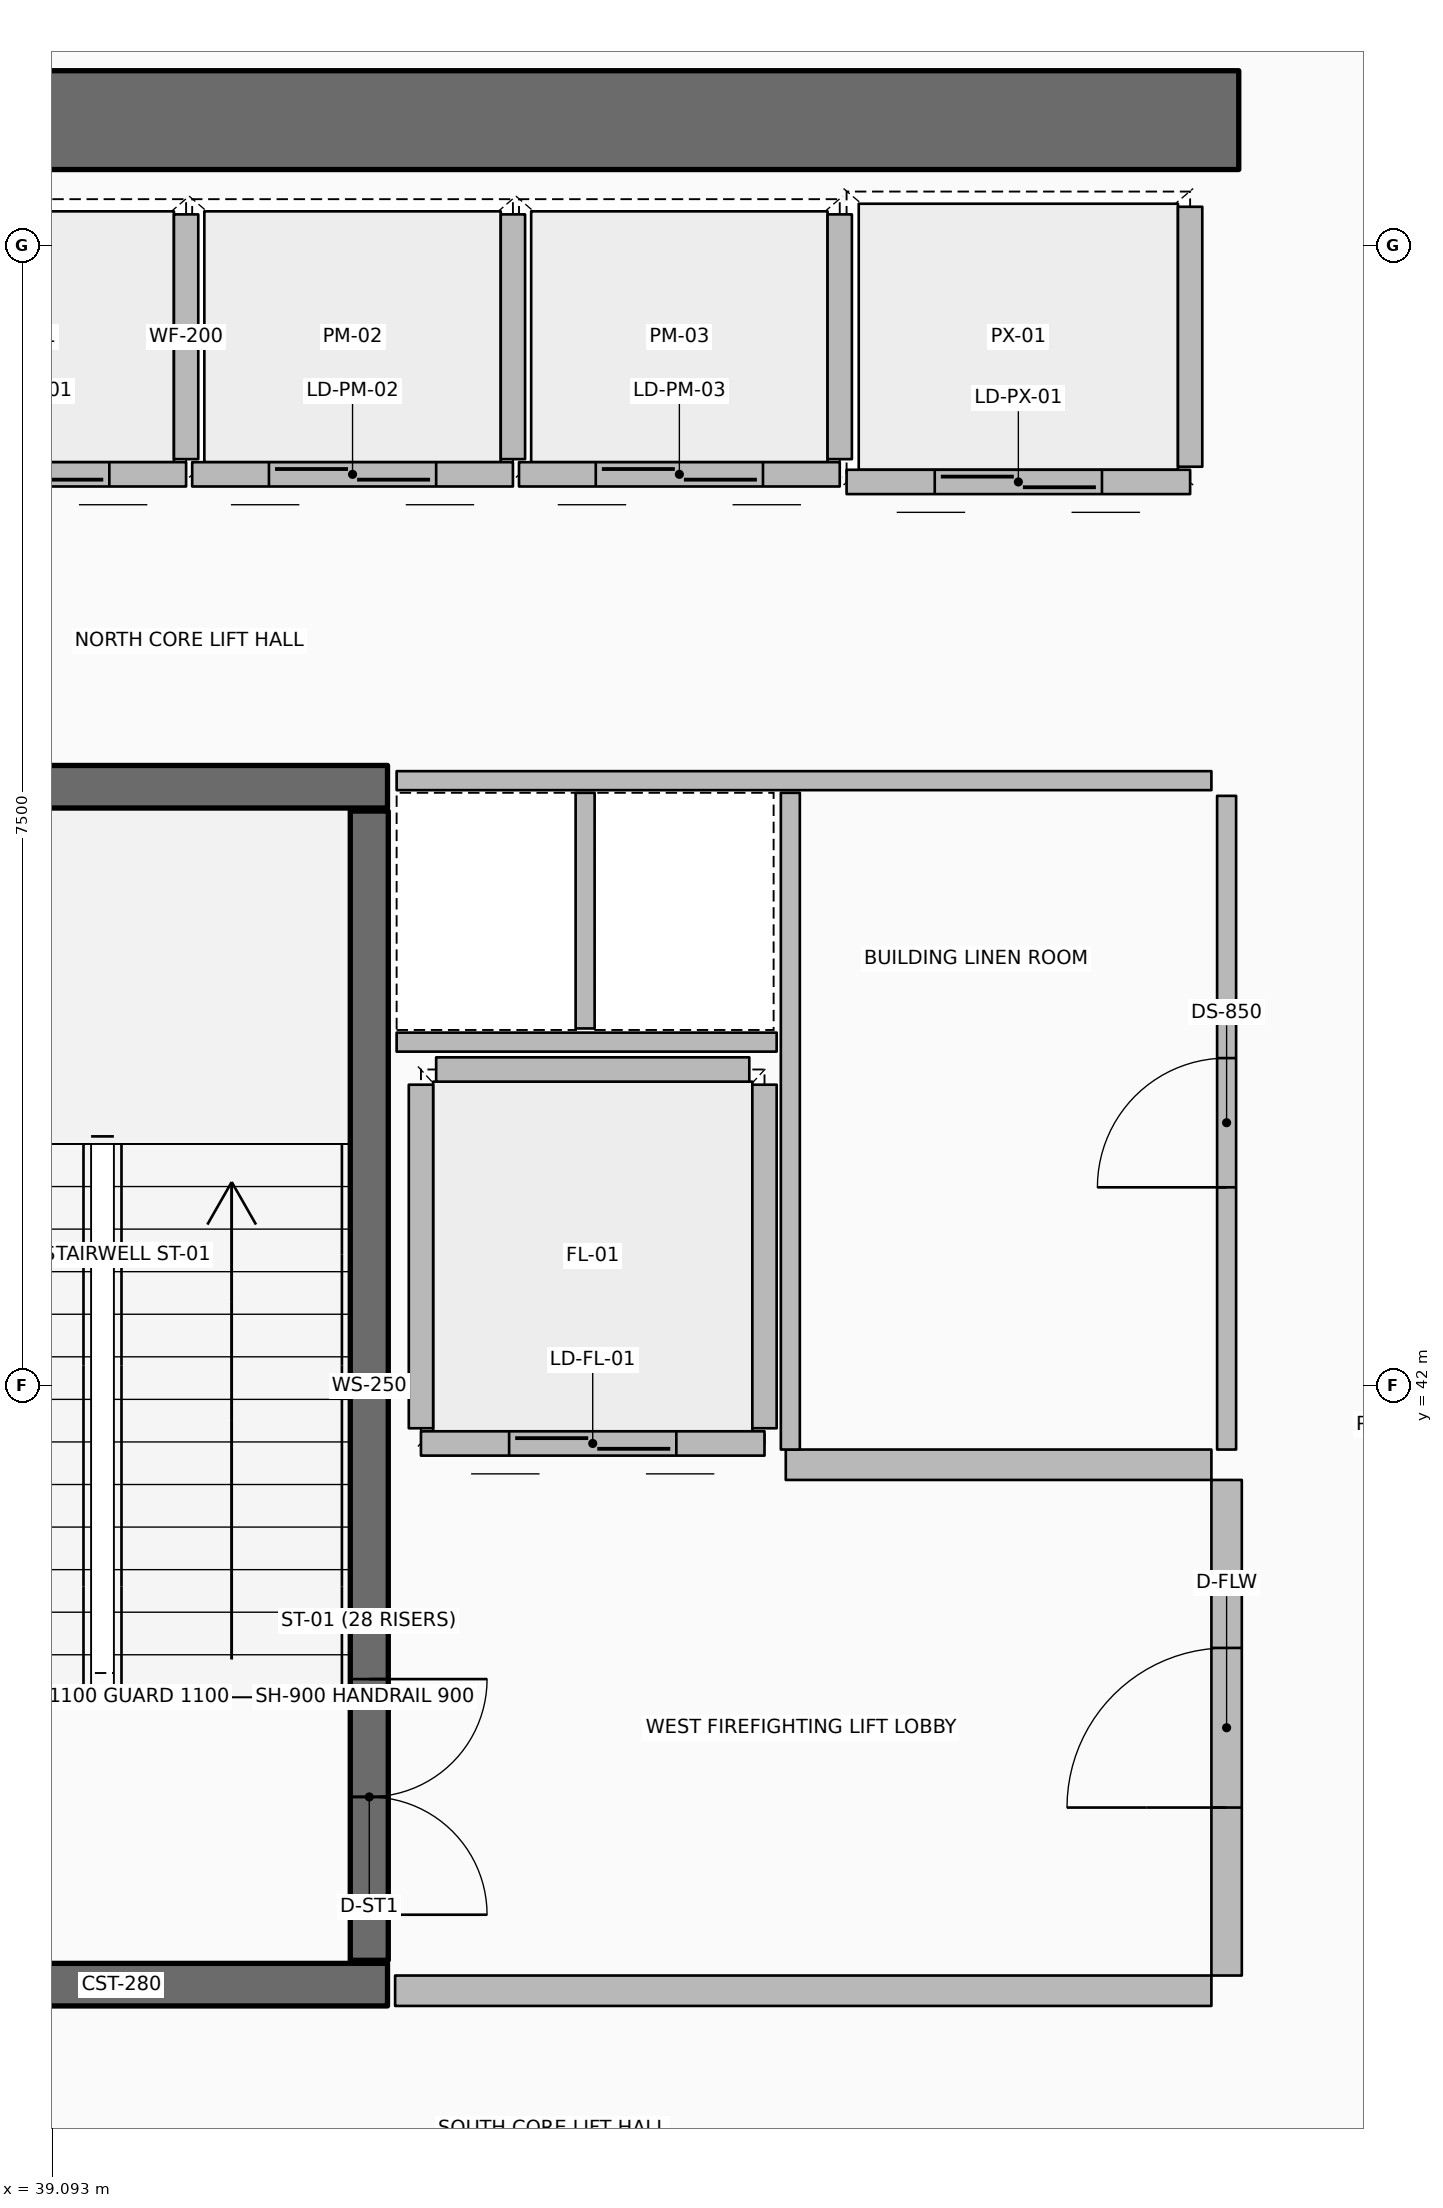
"""IFC4 building model, lengths in metres.
Left out: names, types, materials, properties, quantities, classifications, styles, units other than length and angle.
Written with IfcOpenShell. Run it as: python <this file> out.ifc"""

import sys

from ifc_helpers import new_model, si_unit, direction, frame, frame_2d, origin, origin_2d, place, context, subcontext, project, spatial, rectangle, hollow_rectangle, extrude, element, fill, save


model = new_model("IFC4")
c1 = context("Model", 3, precision=1e-05, world=origin(), true_north=direction((0.0, 1.0)))
c2 = subcontext(c1, "Body", "Model", "MODEL_VIEW")
j1 = project(units=[si_unit("LENGTHUNIT", "METRE"), si_unit("PLANEANGLEUNIT", "RADIAN")], contexts=[c1])
p1 = place(None, origin())
s1 = spatial("IfcSite", under=j1, at=p1, CompositionType="ELEMENT")
p2 = place(p1, origin())
s2 = spatial("IfcBuilding", under=s1, at=p2, CompositionType="ELEMENT")
p3 = place(p2, frame((0.0, 0.0, 231.9)))
s3 = spatial("IfcBuildingStorey", under=s2, at=p3, CompositionType="ELEMENT", Elevation=231.9)
p4 = place(p3, frame((37.15, 50.325, 0.0), z_axis=(0.0, 0.0, 1.0), x_axis=(1.0, 0.0, 0.0)))
e1 = element("IfcWall", 1, at=p4, inside=s3, PredefinedType="SHEAR", context=c2, shape_type="SweptSolid", body=[
    extrude(rectangle(XDim=9.75, YDim=0.65, at=frame_2d((4.875, 0.0))), origin(), (0.0, 0.0, 1.0), 4.8),
])
for number, where, z_axis, x_axis in (
    (2, (37.8, 38.06, 0.0), (0.0, 0.0, 1.0), (1.0, 0.0, 0.0)),
    (3, (37.8, 45.94, 0.0), (0.0, 0.0, 1.0), (1.0, 0.0, 0.0)),
):
    element("IfcWall", number, at=place(p3, frame(where, z_axis=z_axis, x_axis=x_axis)), inside=s3, PredefinedType="SHEAR", context=c2, shape_type="SweptSolid", body=[
        extrude(rectangle(XDim=3.5, YDim=0.28, at=frame_2d((1.75, 0.0))), origin(), (0.0, 0.0, 1.0), 4.8),
    ])
p5 = place(p3, frame((41.18, 43.59, 0.0), z_axis=(0.0, 0.0, 1.0), x_axis=(1.0, 0.0, 0.0)))
e4 = element("IfcColumn", 4, at=p5, inside=s3, PredefinedType="COLUMN", context=c2, shape_type="SweptSolid", body=[
    extrude(hollow_rectangle(XDim=0.2, YDim=0.2, WallThickness=0.01, InnerFilletRadius=0.01, OuterFilletRadius=0.02, at=origin_2d()), origin(), (0.0, 0.0, 1.0), 2.195),
])
p6 = place(p3, frame((41.18, 38.22, 0.0), z_axis=(0.0, 0.0, 1.0), x_axis=(0.0, 1.0, 0.0)))
e5 = element("IfcWall", 5, at=p6, inside=s3, PredefinedType="SOLIDWALL", context=c2, shape_type="SweptSolid", body=[
    extrude(rectangle(XDim=7.56, YDim=0.25, at=frame_2d((3.78, 0.0))), origin(), (0.0, 0.0, 1.0), 4.4),
])
p7 = place(p6, frame((0.3, 0.0, 0.0)))
e6 = element("IfcOpeningElement", 6, at=p7, cuts=e5, PredefinedType="OPENING", context=c2, shape_type="SweptSolid", body=[
    extrude(rectangle(XDim=1.55, YDim=2.15, at=frame_2d((0.775, 1.075))), frame((0.0, 0.135, 0.0), z_axis=(0.0, -1.0, 0.0), x_axis=(1.0, 0.0, 0.0)), (0.0, 0.0, 1.0), 0.27),
])
p8 = place(p3, frame((39.975, 47.995, 0.0), z_axis=(0.0, 0.0, 1.0), x_axis=(-1.0, 0.0, 0.0)))
e7 = element("IfcWall", 7, at=p8, inside=s3, PredefinedType="PARTITIONING", context=c2, shape_type="SweptSolid", body=[
    extrude(rectangle(XDim=2.11, YDim=0.16, at=frame_2d((1.055, 0.0))), origin(), (0.0, 0.0, 1.0), 4.4),
])
p9 = place(p8, frame((0.505, 0.0, 0.0)))
e8 = element("IfcOpeningElement", 8, at=p9, cuts=e7, PredefinedType="OPENING", context=c2, shape_type="SweptSolid", body=[
    extrude(rectangle(XDim=1.1, YDim=2.1, at=frame_2d((0.55, 1.05))), frame((0.0, 0.09, 0.0), z_axis=(0.0, -1.0, 0.0), x_axis=(1.0, 0.0, 0.0)), (0.0, 0.0, 1.0), 0.18),
])
p10 = place(p3, frame((39.975, 48.095, 0.0), z_axis=(0.0, 0.0, 1.0), x_axis=(0.0, 1.0, 0.0)))
e9 = element("IfcWall", 9, at=p10, inside=s3, PredefinedType="PARTITIONING", context=c2, shape_type="SweptSolid", body=[
    extrude(rectangle(XDim=1.61, YDim=0.16, at=frame_2d((0.805, 0.0))), origin(), (0.0, 0.0, 1.0), 4.4),
])
p11 = place(p3, frame((42.125, 47.995, 0.0), z_axis=(0.0, 0.0, 1.0), x_axis=(-1.0, 0.0, 0.0)))
e10 = element("IfcWall", 10, at=p11, inside=s3, PredefinedType="PARTITIONING", context=c2, shape_type="SweptSolid", body=[
    extrude(rectangle(XDim=2.11, YDim=0.16, at=frame_2d((1.055, 0.0))), origin(), (0.0, 0.0, 1.0), 4.4),
])
p12 = place(p11, frame((0.505, 0.0, 0.0)))
e11 = element("IfcOpeningElement", 11, at=p12, cuts=e10, PredefinedType="OPENING", context=c2, shape_type="SweptSolid", body=[
    extrude(rectangle(XDim=1.1, YDim=2.1, at=frame_2d((0.55, 1.05))), frame((0.0, 0.09, 0.0), z_axis=(0.0, -1.0, 0.0), x_axis=(1.0, 0.0, 0.0)), (0.0, 0.0, 1.0), 0.18),
])
p13 = place(p3, frame((42.125, 48.095, 0.0), z_axis=(0.0, 0.0, 1.0), x_axis=(0.0, 1.0, 0.0)))
e12 = element("IfcWall", 12, at=p13, inside=s3, PredefinedType="PARTITIONING", context=c2, shape_type="SweptSolid", body=[
    extrude(rectangle(XDim=1.61, YDim=0.16, at=frame_2d((0.805, 0.0))), origin(), (0.0, 0.0, 1.0), 4.4),
])
p14 = place(p3, frame((44.275, 47.995, 0.0), z_axis=(0.0, 0.0, 1.0), x_axis=(-1.0, 0.0, 0.0)))
e13 = element("IfcWall", 13, at=p14, inside=s3, PredefinedType="PARTITIONING", context=c2, shape_type="SweptSolid", body=[
    extrude(rectangle(XDim=2.11, YDim=0.16, at=frame_2d((1.055, 0.0))), origin(), (0.0, 0.0, 1.0), 4.4),
])
p15 = place(p14, frame((0.505, 0.0, 0.0)))
e14 = element("IfcOpeningElement", 14, at=p15, cuts=e13, PredefinedType="OPENING", context=c2, shape_type="SweptSolid", body=[
    extrude(rectangle(XDim=1.1, YDim=2.1, at=frame_2d((0.55, 1.05))), frame((0.0, 0.09, 0.0), z_axis=(0.0, -1.0, 0.0), x_axis=(1.0, 0.0, 0.0)), (0.0, 0.0, 1.0), 0.18),
])
p16 = place(p3, frame((44.275, 48.095, 0.0), z_axis=(0.0, 0.0, 1.0), x_axis=(0.0, 1.0, 0.0)))
e15 = element("IfcWall", 15, at=p16, inside=s3, PredefinedType="PARTITIONING", context=c2, shape_type="SweptSolid", body=[
    extrude(rectangle(XDim=1.61, YDim=0.16, at=frame_2d((0.805, 0.0))), origin(), (0.0, 0.0, 1.0), 4.4),
])
p17 = place(p3, frame((46.58, 47.945, 0.0), z_axis=(0.0, 0.0, 1.0), x_axis=(-1.0, 0.0, 0.0)))
e16 = element("IfcWall", 16, at=p17, inside=s3, PredefinedType="PARTITIONING", context=c2, shape_type="SweptSolid", body=[
    extrude(rectangle(XDim=2.26, YDim=0.16, at=frame_2d((1.13, 0.0))), origin(), (0.0, 0.0, 1.0), 4.4),
])
p18 = place(p17, frame((0.58, 0.0, 0.0)))
e17 = element("IfcOpeningElement", 17, at=p18, cuts=e16, PredefinedType="OPENING", context=c2, shape_type="SweptSolid", body=[
    extrude(rectangle(XDim=1.1, YDim=2.1, at=frame_2d((0.55, 1.05))), frame((0.0, 0.09, 0.0), z_axis=(0.0, -1.0, 0.0), x_axis=(1.0, 0.0, 0.0)), (0.0, 0.0, 1.0), 0.18),
])
p19 = place(p3, frame((46.58, 48.045, 0.0), z_axis=(0.0, 0.0, 1.0), x_axis=(0.0, 1.0, 0.0)))
e18 = element("IfcWall", 18, at=p19, inside=s3, PredefinedType="PARTITIONING", context=c2, shape_type="SweptSolid", body=[
    extrude(rectangle(XDim=1.71, YDim=0.16, at=frame_2d((0.855, 0.0))), origin(), (0.0, 0.0, 1.0), 4.4),
])
p20 = place(p3, frame((43.78, 41.62, 0.0), z_axis=(0.0, 0.0, 1.0), x_axis=(-1.0, 0.0, 0.0)))
e19 = element("IfcWall", 19, at=p20, inside=s3, PredefinedType="PARTITIONING", context=c2, shape_type="SweptSolid", body=[
    extrude(rectangle(XDim=2.26, YDim=0.16, at=frame_2d((1.13, 0.0))), origin(), (0.0, 0.0, 1.0), 4.4),
])
p21 = place(p20, frame((0.58, 0.0, 0.0)))
e20 = element("IfcOpeningElement", 20, at=p21, cuts=e19, PredefinedType="OPENING", context=c2, shape_type="SweptSolid", body=[
    extrude(rectangle(XDim=1.1, YDim=2.1, at=frame_2d((0.55, 1.05))), frame((0.0, 0.09, 0.0), z_axis=(0.0, -1.0, 0.0), x_axis=(1.0, 0.0, 0.0)), (0.0, 0.0, 1.0), 0.18),
])
for number, where, z_axis, x_axis in (
    (21, (43.78, 41.72, 0.0), (0.0, 0.0, 1.0), (0.0, 1.0, 0.0)),
    (22, (41.52, 41.72, 0.0), (0.0, 0.0, 1.0), (0.0, 1.0, 0.0)),
):
    element("IfcWall", number, at=place(p3, frame(where, z_axis=z_axis, x_axis=x_axis)), inside=s3, PredefinedType="PARTITIONING", context=c2, shape_type="SweptSolid", body=[
        extrude(rectangle(XDim=2.26, YDim=0.16, at=frame_2d((1.13, 0.0))), origin(), (0.0, 0.0, 1.0), 4.4),
    ])
p22 = place(p3, frame((41.62, 44.08, 0.0), z_axis=(0.0, 0.0, 1.0), x_axis=(1.0, 0.0, 0.0)))
e23 = element("IfcWall", 23, at=p22, inside=s3, PredefinedType="PARTITIONING", context=c2, shape_type="SweptSolid", body=[
    extrude(rectangle(XDim=2.06, YDim=0.16, at=frame_2d((1.03, 0.0))), origin(), (0.0, 0.0, 1.0), 4.4),
])
p23 = place(p3, frame((41.35, 38.02, 0.0), z_axis=(0.0, 0.0, 1.0), x_axis=(1.0, 0.0, 0.0)))
e24 = element("IfcWall", 24, at=p23, inside=s3, PredefinedType="PARTITIONING", context=c2, shape_type="SweptSolid", body=[
    extrude(rectangle(XDim=5.37, YDim=0.2, at=frame_2d((2.685, 0.0))), origin(), (0.0, 0.0, 1.0), 4.4),
])
p24 = place(p3, frame((43.92, 41.48, 0.0), z_axis=(0.0, 0.0, 1.0), x_axis=(1.0, 0.0, 0.0)))
e25 = element("IfcWall", 25, at=p24, inside=s3, PredefinedType="PARTITIONING", context=c2, shape_type="SweptSolid", body=[
    extrude(rectangle(XDim=2.8, YDim=0.2, at=frame_2d((1.4, 0.0))), origin(), (0.0, 0.0, 1.0), 4.4),
])
p25 = place(p3, frame((46.82, 38.12, 0.0), z_axis=(0.0, 0.0, 1.0), x_axis=(0.0, 1.0, 0.0)))
e26 = element("IfcWall", 26, at=p25, inside=s3, PredefinedType="PARTITIONING", context=c2, shape_type="SweptSolid", body=[
    extrude(rectangle(XDim=3.26, YDim=0.2, at=frame_2d((1.63, 0.0))), origin(), (0.0, 0.0, 1.0), 4.4),
])
p26 = place(p25, frame((1.105, 0.0, 0.0)))
e27 = element("IfcOpeningElement", 27, at=p26, cuts=e26, PredefinedType="OPENING", context=c2, shape_type="SweptSolid", body=[
    extrude(rectangle(XDim=1.05, YDim=2.1, at=frame_2d((0.525, 1.05))), frame((0.0, 0.11, 0.0), z_axis=(0.0, -1.0, 0.0), x_axis=(1.0, 0.0, 0.0)), (0.0, 0.0, 1.0), 0.22),
])
p27 = place(p3, frame((41.36, 45.98, 0.0), z_axis=(0.0, 0.0, 1.0), x_axis=(1.0, 0.0, 0.0)))
e28 = element("IfcWall", 28, at=p27, inside=s3, PredefinedType="PARTITIONING", context=c2, shape_type="SweptSolid", body=[
    extrude(rectangle(XDim=5.36, YDim=0.125, at=frame_2d((2.68, 0.0))), origin(), (0.0, 0.0, 1.0), 3.84),
])
p28 = place(p3, frame((41.36, 44.26, 0.0), z_axis=(0.0, 0.0, 1.0), x_axis=(1.0, 0.0, 0.0)))
e29 = element("IfcWall", 29, at=p28, inside=s3, PredefinedType="PARTITIONING", context=c2, shape_type="SweptSolid", body=[
    extrude(rectangle(XDim=2.5, YDim=0.125, at=frame_2d((1.25, 0.0))), origin(), (0.0, 0.0, 1.0), 3.84),
])
p29 = place(p3, frame((42.6, 44.35, 0.0), z_axis=(0.0, 0.0, 1.0), x_axis=(0.0, 1.0, 0.0)))
e30 = element("IfcWall", 30, at=p29, inside=s3, PredefinedType="PARTITIONING", context=c2, shape_type="SweptSolid", body=[
    extrude(rectangle(XDim=1.55, YDim=0.125, at=frame_2d((0.775, 0.0))), origin(), (0.0, 0.0, 1.0), 3.84),
])
p30 = place(p3, frame((43.95, 41.58, 0.0), z_axis=(0.0, 0.0, 1.0), x_axis=(0.0, 1.0, 0.0)))
e31 = element("IfcWall", 31, at=p30, inside=s3, PredefinedType="PARTITIONING", context=c2, shape_type="SweptSolid", body=[
    extrude(rectangle(XDim=4.32, YDim=0.125, at=frame_2d((2.16, 0.0))), origin(), (0.0, 0.0, 1.0), 3.84),
])
p31 = place(p3, frame((46.82, 41.58, 0.0), z_axis=(0.0, 0.0, 1.0), x_axis=(0.0, 1.0, 0.0)))
e32 = element("IfcWall", 32, at=p31, inside=s3, PredefinedType="PARTITIONING", context=c2, shape_type="SweptSolid", body=[
    extrude(rectangle(XDim=4.3, YDim=0.125, at=frame_2d((2.15, 0.0))), origin(), (0.0, 0.0, 1.0), 3.84),
])
p32 = place(p31, frame((1.725, 0.0, 0.0)))
e33 = element("IfcOpeningElement", 33, at=p32, cuts=e32, PredefinedType="OPENING", context=c2, shape_type="SweptSolid", body=[
    extrude(rectangle(XDim=0.85, YDim=2.06, at=frame_2d((0.425, 1.03))), frame((0.0, 0.073, 0.0), z_axis=(0.0, -1.0, 0.0), x_axis=(1.0, 0.0, 0.0)), (0.0, 0.0, 1.0), 0.145),
])
p33 = place(p7, origin())
e34 = element("IfcDoor", 34, at=p33, inside=s3, OperationType="DOUBLE_DOOR_SINGLE_SWING", PredefinedType="DOOR", context=c2, shape_type="SweptSolid", body=[
    extrude(rectangle(XDim=1.55, YDim=2.15, at=frame_2d((0.775, 1.075))), frame((0.0, 0.025, 0.0), z_axis=(0.0, -1.0, 0.0), x_axis=(1.0, 0.0, 0.0)), (0.0, 0.0, 1.0), 0.05),
])
fill(e6, e34)
p34 = place(p9, origin())
e35 = element("IfcDoor", 35, at=p34, inside=s3, OperationType="DOUBLE_DOOR_SLIDING", PredefinedType="DOOR", context=c2, shape_type="SweptSolid", body=[
    extrude(rectangle(XDim=1.1, YDim=2.1, at=frame_2d((0.55, 1.05))), frame((0.0, 0.025, 0.0), z_axis=(0.0, -1.0, 0.0), x_axis=(1.0, 0.0, 0.0)), (0.0, 0.0, 1.0), 0.05),
])
fill(e8, e35)
p35 = place(p12, origin())
e36 = element("IfcDoor", 36, at=p35, inside=s3, OperationType="DOUBLE_DOOR_SLIDING", PredefinedType="DOOR", context=c2, shape_type="SweptSolid", body=[
    extrude(rectangle(XDim=1.1, YDim=2.1, at=frame_2d((0.55, 1.05))), frame((0.0, 0.025, 0.0), z_axis=(0.0, -1.0, 0.0), x_axis=(1.0, 0.0, 0.0)), (0.0, 0.0, 1.0), 0.05),
])
fill(e11, e36)
p36 = place(p15, origin())
e37 = element("IfcDoor", 37, at=p36, inside=s3, OperationType="DOUBLE_DOOR_SLIDING", PredefinedType="DOOR", context=c2, shape_type="SweptSolid", body=[
    extrude(rectangle(XDim=1.1, YDim=2.1, at=frame_2d((0.55, 1.05))), frame((0.0, 0.025, 0.0), z_axis=(0.0, -1.0, 0.0), x_axis=(1.0, 0.0, 0.0)), (0.0, 0.0, 1.0), 0.05),
])
fill(e14, e37)
p37 = place(p18, origin())
e38 = element("IfcDoor", 38, at=p37, inside=s3, OperationType="DOUBLE_DOOR_SLIDING", PredefinedType="DOOR", context=c2, shape_type="SweptSolid", body=[
    extrude(rectangle(XDim=1.1, YDim=2.1, at=frame_2d((0.55, 1.05))), frame((0.0, 0.025, 0.0), z_axis=(0.0, -1.0, 0.0), x_axis=(1.0, 0.0, 0.0)), (0.0, 0.0, 1.0), 0.05),
])
fill(e17, e38)
p38 = place(p21, origin())
e39 = element("IfcDoor", 39, at=p38, inside=s3, OperationType="DOUBLE_DOOR_SLIDING", PredefinedType="DOOR", context=c2, shape_type="SweptSolid", body=[
    extrude(rectangle(XDim=1.1, YDim=2.1, at=frame_2d((0.55, 1.05))), frame((0.0, 0.025, 0.0), z_axis=(0.0, -1.0, 0.0), x_axis=(1.0, 0.0, 0.0)), (0.0, 0.0, 1.0), 0.05),
])
fill(e20, e39)
p39 = place(p26, origin())
e40 = element("IfcDoor", 40, at=p39, inside=s3, OperationType="SINGLE_SWING_LEFT", PredefinedType="DOOR", context=c2, shape_type="SweptSolid", body=[
    extrude(rectangle(XDim=1.05, YDim=2.1, at=frame_2d((0.525, 1.05))), frame((0.0, 0.025, 0.0), z_axis=(0.0, -1.0, 0.0), x_axis=(1.0, 0.0, 0.0)), (0.0, 0.0, 1.0), 0.05),
])
fill(e27, e40)
p40 = place(p32, origin())
e41 = element("IfcDoor", 41, at=p40, inside=s3, OperationType="SINGLE_SWING_LEFT", PredefinedType="DOOR", context=c2, shape_type="SweptSolid", body=[
    extrude(rectangle(XDim=0.85, YDim=2.06, at=frame_2d((0.425, 1.03))), frame((0.0, 0.025, 0.0), z_axis=(0.0, -1.0, 0.0), x_axis=(1.0, 0.0, 0.0)), (0.0, 0.0, 1.0), 0.05),
])
fill(e33, e41)
save(model, sys.argv[1])
